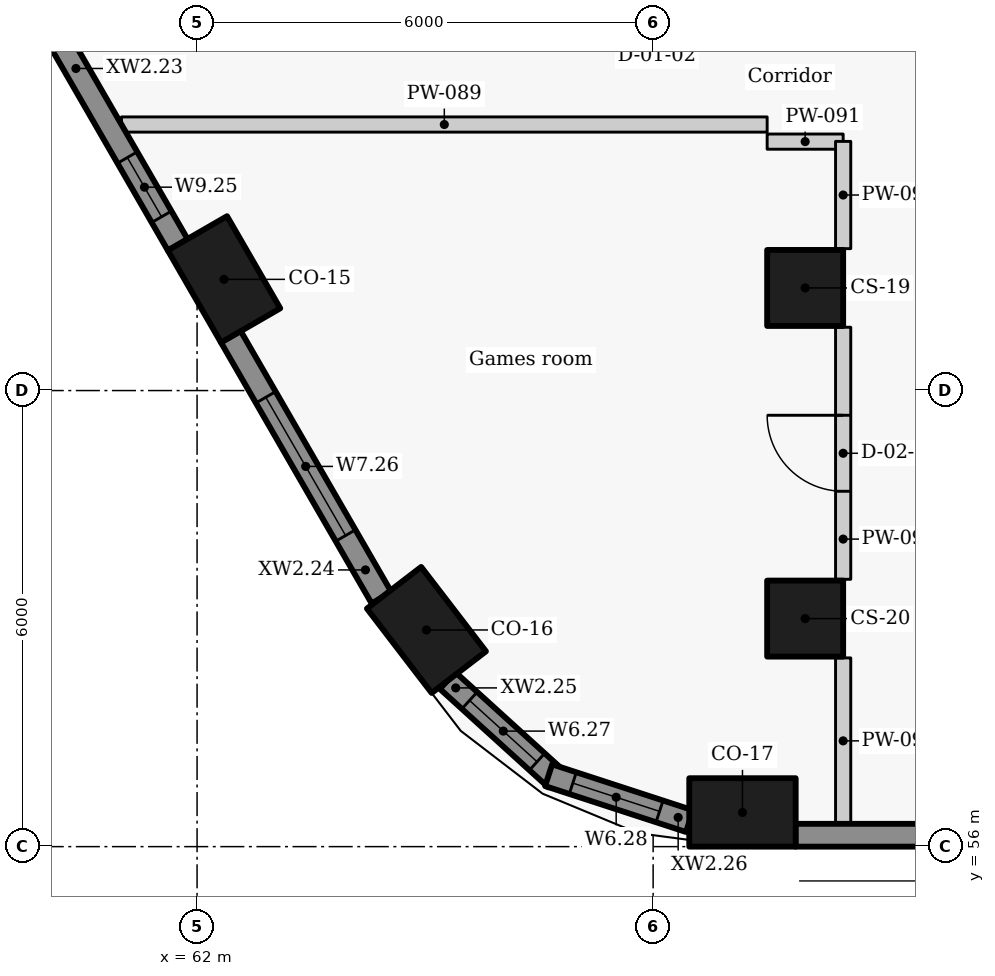
"""IFC4 building model, lengths in metres.
Left out: names, types, materials, properties, quantities, classifications, styles, units other than length and angle.
Written with IfcOpenShell. Run it as: python <this file> out.ifc"""

import sys

from ifc_helpers import new_model, si_unit, direction, frame, frame_2d, origin, origin_2d, place, context, subcontext, project, spatial, rectangle, extrude, element, fill, save


model = new_model("IFC4")
c1 = context("Model", 3, precision=1e-05, world=origin(), true_north=direction((0.0, 1.0)))
c2 = subcontext(c1, "Body", "Model", "MODEL_VIEW")
j1 = project(units=[si_unit("LENGTHUNIT", "METRE"), si_unit("PLANEANGLEUNIT", "RADIAN")], contexts=[c1])
p1 = place(None, origin())
s1 = spatial("IfcSite", under=j1, at=p1, CompositionType="ELEMENT")
p2 = place(p1, origin())
s2 = spatial("IfcBuilding", under=s1, at=p2, CompositionType="ELEMENT")
p3 = place(p2, frame((0.0, 0.0, 97.5)))
s3 = spatial("IfcBuildingStorey", under=s2, at=p3, CompositionType="ELEMENT", Elevation=97.5)
for number, where, z_axis, x_axis in (
    (1, (62.354, 63.463, 0.0), (0.0, 0.0, 1.0), (0.5, -0.866, 0.0)),
    (2, (65.018, 58.851, 0.0), (0.0, 0.0, 1.0), (0.609, -0.793, 0.0)),
    (3, (69.175, 56.45, 0.0), (0.0, 0.0, 1.0), (1.0, 0.0, 0.0)),
):
    element("IfcColumn", number, at=place(p3, frame(where, z_axis=z_axis, x_axis=x_axis)), inside=s3, PredefinedType="COLUMN", context=c2, shape_type="SweptSolid", body=[
        extrude(rectangle(XDim=1.4, YDim=0.9, at=origin_2d()), origin(), (0.0, 0.0, 1.0), 3.3),
    ])
for number, where, z_axis, x_axis in (
    (4, (70.0, 63.35, 0.0), (0.0, 0.0, 1.0), (0.0, -1.0, 0.0)),
    (5, (70.0, 59.0, 0.0), (0.0, 0.0, 1.0), (0.0, -1.0, 0.0)),
):
    element("IfcColumn", number, at=place(p3, frame(where, z_axis=z_axis, x_axis=x_axis)), inside=s3, PredefinedType="COLUMN", context=c2, shape_type="SweptSolid", body=[
        extrude(rectangle(XDim=1.0, YDim=1.0, at=origin_2d()), origin(), (0.0, 0.0, 1.0), 3.3),
    ])
p4 = place(p3, frame((59.78, 67.323, 0.0), z_axis=(0.0, 0.0, 1.0), x_axis=(0.499957037901, -0.866050206543, 0.0)))
e6 = element("IfcWall", 6, at=p4, inside=s3, PredefinedType="SOLIDWALL", context=c2, shape_type="SweptSolid", body=[
    extrude(rectangle(XDim=3.934, YDim=0.3, at=frame_2d((1.967, 0.0))), origin(), (0.0, 0.0, 1.0), 2.425),
])
p5 = place(p4, frame((2.606, 0.0, 0.9)))
e7 = element("IfcOpeningElement", 7, at=p5, cuts=e6, PredefinedType="OPENING", context=c2, shape_type="SweptSolid", body=[
    extrude(rectangle(XDim=0.9, YDim=1.1, at=frame_2d((0.45, 0.55))), frame((0.0, 0.16, 0.0), z_axis=(0.0, -1.0, 0.0), x_axis=(1.0, 0.0, 0.0)), (0.0, 0.0, 1.0), 0.32),
])
p6 = place(p3, frame((62.443, 62.71, 0.0), z_axis=(0.0, 0.0, 1.0), x_axis=(0.500043828347, -0.866000097998, 0.0)))
e8 = element("IfcWall", 8, at=p6, inside=s3, PredefinedType="SOLIDWALL", context=c2, shape_type="SweptSolid", body=[
    extrude(rectangle(XDim=3.968, YDim=0.3, at=frame_2d((1.984, 0.0))), origin(), (0.0, 0.0, 1.0), 2.425),
])
p7 = place(p6, frame((0.922, 0.0, 0.9)))
e9 = element("IfcOpeningElement", 9, at=p7, cuts=e8, PredefinedType="OPENING", context=c2, shape_type="SweptSolid", body=[
    extrude(rectangle(XDim=2.1, YDim=1.1, at=frame_2d((1.05, 0.55))), frame((0.0, 0.16, 0.0), z_axis=(0.0, -1.0, 0.0), x_axis=(1.0, 0.0, 0.0)), (0.0, 0.0, 1.0), 0.32),
])
p8 = place(p3, frame((65.295, 58.186, 0.0), z_axis=(0.0, 0.0, 1.0), x_axis=(0.740421367382, -0.672142989791, 0.0)))
e10 = element("IfcWall", 10, at=p8, inside=s3, PredefinedType="SOLIDWALL", context=c2, shape_type="SweptSolid", body=[
    extrude(rectangle(XDim=1.927, YDim=0.3, at=frame_2d((0.964, 0.0))), origin(), (0.0, 0.0, 1.0), 2.425),
])
p9 = place(p8, frame((0.391, 0.0, 0.9)))
e11 = element("IfcOpeningElement", 11, at=p9, cuts=e10, PredefinedType="OPENING", context=c2, shape_type="SweptSolid", body=[
    extrude(rectangle(XDim=1.2, YDim=1.1, at=frame_2d((0.6, 0.55))), frame((0.0, 0.16, 0.0), z_axis=(0.0, -1.0, 0.0), x_axis=(1.0, 0.0, 0.0)), (0.0, 0.0, 1.0), 0.32),
])
p10 = place(p3, frame((66.625, 56.939, 0.0), z_axis=(0.0, 0.0, 1.0), x_axis=(0.950777961763, -0.309872985958, 0.0)))
e12 = element("IfcWall", 12, at=p10, inside=s3, PredefinedType="SOLIDWALL", context=c2, shape_type="SweptSolid", body=[
    extrude(rectangle(XDim=1.95, YDim=0.3, at=frame_2d((0.975, 0.0))), origin(), (0.0, 0.0, 1.0), 2.425),
])
p11 = place(p10, frame((0.335, 0.0, 0.9)))
e13 = element("IfcOpeningElement", 13, at=p11, cuts=e12, PredefinedType="OPENING", context=c2, shape_type="SweptSolid", body=[
    extrude(rectangle(XDim=1.2, YDim=1.1, at=frame_2d((0.6, 0.55))), frame((0.0, 0.16, 0.0), z_axis=(0.0, -1.0, 0.0), x_axis=(1.0, 0.0, 0.0)), (0.0, 0.0, 1.0), 0.32),
])
p12 = place(p3, frame((69.871, 56.15, 0.0), z_axis=(0.0, 0.0, 1.0), x_axis=(1.0, 0.0, 0.0)))
e14 = element("IfcWall", 14, at=p12, inside=s3, PredefinedType="SOLIDWALL", context=c2, shape_type="SweptSolid", body=[
    extrude(rectangle(XDim=19.94, YDim=0.3, at=frame_2d((9.97, 0.0))), origin(), (0.0, 0.0, 1.0), 2.425),
])
p13 = place(p3, frame((61.005, 65.5, 0.0), z_axis=(0.0, 0.0, 1.0), x_axis=(1.0, 0.0, 0.0)))
e15 = element("IfcWall", 15, at=p13, inside=s3, PredefinedType="PARTITIONING", context=c2, shape_type="SweptSolid", body=[
    extrude(rectangle(XDim=8.495, YDim=0.2, at=frame_2d((4.248, 0.0))), origin(), (0.0, 0.0, 1.0), 2.405),
])
p14 = place(p3, frame((69.5, 65.275, 0.0), z_axis=(0.0, 0.0, 1.0), x_axis=(1.0, 0.0, 0.0)))
e16 = element("IfcWall", 16, at=p14, inside=s3, PredefinedType="PARTITIONING", context=c2, shape_type="SweptSolid", body=[
    extrude(rectangle(XDim=1.0, YDim=0.2, at=frame_2d((0.5, 0.0))), origin(), (0.0, 0.0, 1.0), 2.505),
])
p15 = place(p3, frame((70.5, 56.3, 0.0), z_axis=(0.0, 0.0, 1.0), x_axis=(0.0, 1.0, 0.0)))
e17 = element("IfcWall", 17, at=p15, inside=s3, PredefinedType="PARTITIONING", context=c2, shape_type="SweptSolid", body=[
    extrude(rectangle(XDim=2.183, YDim=0.2, at=frame_2d((1.091, 0.0))), origin(), (0.0, 0.0, 1.0), 3.025),
])
p16 = place(p3, frame((70.5, 59.517, 0.0), z_axis=(0.0, 0.0, 1.0), x_axis=(0.0, 1.0, 0.0)))
e18 = element("IfcWall", 18, at=p16, inside=s3, PredefinedType="PARTITIONING", context=c2, shape_type="SweptSolid", body=[
    extrude(rectangle(XDim=3.316, YDim=0.2, at=frame_2d((1.658, 0.0))), origin(), (0.0, 0.0, 1.0), 3.025),
])
p17 = place(p16, frame((1.158, 0.0, 0.0)))
e19 = element("IfcOpeningElement", 19, at=p17, cuts=e18, PredefinedType="OPENING", context=c2, shape_type="SweptSolid", body=[
    extrude(rectangle(XDim=1.0, YDim=2.1, at=frame_2d((0.5, 1.05))), frame((0.0, 0.11, 0.0), z_axis=(0.0, -1.0, 0.0), x_axis=(1.0, 0.0, 0.0)), (0.0, 0.0, 1.0), 0.22),
])
p18 = place(p3, frame((70.5, 63.867, 0.0), z_axis=(0.0, 0.0, 1.0), x_axis=(0.0, 1.0, 0.0)))
e20 = element("IfcWall", 20, at=p18, inside=s3, PredefinedType="PARTITIONING", context=c2, shape_type="SweptSolid", body=[
    extrude(rectangle(XDim=1.411, YDim=0.2, at=frame_2d((0.706, 0.0))), origin(), (0.0, 0.0, 1.0), 3.025),
])
p19 = place(p5, origin())
e21 = element("IfcWindow", 21, at=p19, inside=s3, PartitioningType="SINGLE_PANEL", PredefinedType="WINDOW", context=c2, shape_type="SweptSolid", body=[
    extrude(rectangle(XDim=0.9, YDim=1.1, at=frame_2d((0.45, 0.55))), frame((0.0, 0.03, 0.0), z_axis=(0.0, -1.0, 0.0), x_axis=(1.0, 0.0, 0.0)), (0.0, 0.0, 1.0), 0.06),
])
fill(e7, e21)
p20 = place(p7, origin())
e22 = element("IfcWindow", 22, at=p20, inside=s3, PartitioningType="SINGLE_PANEL", PredefinedType="WINDOW", context=c2, shape_type="SweptSolid", body=[
    extrude(rectangle(XDim=2.1, YDim=1.1, at=frame_2d((1.05, 0.55))), frame((0.0, 0.03, 0.0), z_axis=(0.0, -1.0, 0.0), x_axis=(1.0, 0.0, 0.0)), (0.0, 0.0, 1.0), 0.06),
])
fill(e9, e22)
p21 = place(p9, origin())
e23 = element("IfcWindow", 23, at=p21, inside=s3, PartitioningType="SINGLE_PANEL", PredefinedType="WINDOW", context=c2, shape_type="SweptSolid", body=[
    extrude(rectangle(XDim=1.2, YDim=1.1, at=frame_2d((0.6, 0.55))), frame((0.0, 0.03, 0.0), z_axis=(0.0, -1.0, 0.0), x_axis=(1.0, 0.0, 0.0)), (0.0, 0.0, 1.0), 0.06),
])
fill(e11, e23)
p22 = place(p11, origin())
e24 = element("IfcWindow", 24, at=p22, inside=s3, PartitioningType="SINGLE_PANEL", PredefinedType="WINDOW", context=c2, shape_type="SweptSolid", body=[
    extrude(rectangle(XDim=1.2, YDim=1.1, at=frame_2d((0.6, 0.55))), frame((0.0, 0.03, 0.0), z_axis=(0.0, -1.0, 0.0), x_axis=(1.0, 0.0, 0.0)), (0.0, 0.0, 1.0), 0.06),
])
fill(e13, e24)
p23 = place(p17, origin())
e25 = element("IfcDoor", 25, at=p23, inside=s3, OperationType="SINGLE_SWING_RIGHT", PredefinedType="DOOR", context=c2, shape_type="SweptSolid", body=[
    extrude(rectangle(XDim=1.0, YDim=2.1, at=frame_2d((0.5, 1.05))), frame((0.0, 0.025, 0.0), z_axis=(0.0, -1.0, 0.0), x_axis=(1.0, 0.0, 0.0)), (0.0, 0.0, 1.0), 0.05),
])
fill(e19, e25)
save(model, sys.argv[1])
